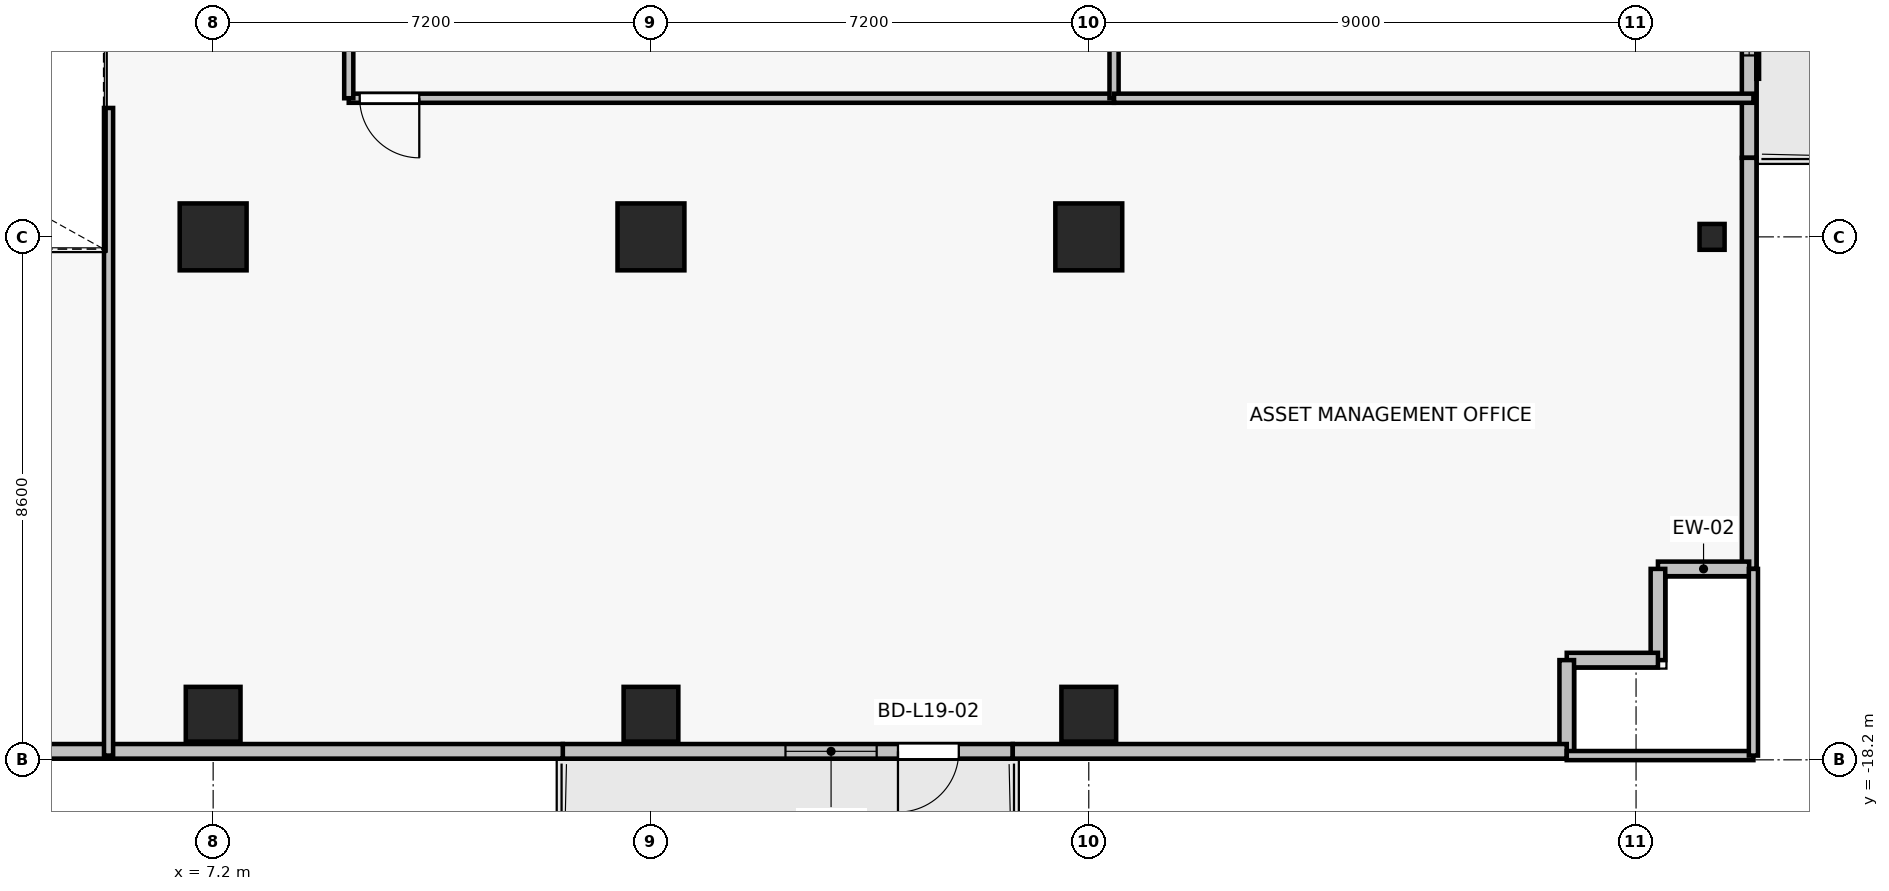
"""IFC4 building model, lengths in metres.
Left out: names, types, materials, properties, quantities, classifications, styles, units other than length and angle.
Written with IfcOpenShell. Run it as: python <this file> out.ifc"""

import sys

from ifc_helpers import new_model, si_unit, direction, frame, frame_2d, origin, origin_2d, place, context, subcontext, project, spatial, rectangle, i_section, extrude, source, transform, mapped, element, fill, save


model = new_model("IFC4")
c1 = context("Model", 3, precision=1e-05, world=origin(), true_north=direction((0.0, 1.0)))
c2 = subcontext(c1, "Body", "Model", "MODEL_VIEW")
j1 = project(units=[si_unit("LENGTHUNIT", "METRE"), si_unit("PLANEANGLEUNIT", "RADIAN")], contexts=[c1])
p1 = place(None, origin())
s1 = spatial("IfcSite", under=j1, at=p1, CompositionType="ELEMENT")
p2 = place(p1, origin())
s2 = spatial("IfcBuilding", under=s1, at=p2, CompositionType="ELEMENT")
p3 = place(p2, frame((0.0, 0.0, 70.3)))
s3 = spatial("IfcBuildingStorey", under=s2, at=p3, CompositionType="ELEMENT", Elevation=70.3)
for number, where, z_axis, x_axis in (
    (1, (7.2, -9.6, 0.0), (0.0, 0.0, 1.0), (1.0, 0.0, 0.0)),
    (2, (14.4, -9.6, 0.0), (0.0, 0.0, 1.0), (1.0, 0.0, 0.0)),
    (3, (21.6, -9.6, 0.0), (0.0, 0.0, 1.0), (1.0, 0.0, 0.0)),
):
    element("IfcColumn", number, at=place(p3, frame(where, z_axis=z_axis, x_axis=x_axis)), inside=s3, PredefinedType="COLUMN", context=c2, shape_type="SweptSolid", body=[
        extrude(rectangle(XDim=1.1, YDim=1.1, at=origin_2d()), origin(), (0.0, 0.0, 1.0), 3.3),
    ])
for number, where, z_axis, x_axis in (
    (4, (7.2, -17.45, 0.0), (0.0, 0.0, 1.0), (1.0, 0.0, 0.0)),
    (5, (14.4, -17.45, 0.0), (0.0, 0.0, 1.0), (1.0, 0.0, 0.0)),
    (6, (21.6, -17.45, 0.0), (0.0, 0.0, 1.0), (1.0, 0.0, 0.0)),
):
    element("IfcColumn", number, at=place(p3, frame(where, z_axis=z_axis, x_axis=x_axis)), inside=s3, PredefinedType="COLUMN", context=c2, shape_type="SweptSolid", body=[
        extrude(rectangle(XDim=0.9, YDim=0.9, at=origin_2d()), origin(), (0.0, 0.0, 1.0), 3.3),
    ])
p4 = place(p3, frame((31.85, -9.6, 0.0), z_axis=(0.0, 0.0, 1.0), x_axis=(1.0, 0.0, 0.0)))
e7 = element("IfcColumn", 7, at=p4, inside=s3, PredefinedType="COLUMN", context=c2, shape_type="SweptSolid", body=[
    extrude(i_section(OverallWidth=0.412, OverallDepth=0.425, WebThickness=0.026, FlangeThickness=0.039, FilletRadius=0.015, at=origin_2d()), origin(), (0.0, 0.0, 1.0), 3.3),
])
p5 = place(p3, frame((20.35, -18.06, 0.0), z_axis=(0.0, 0.0, 1.0), x_axis=(-1.0, 0.0, 0.0)))
e8 = element("IfcWall", 8, at=p5, inside=s3, PredefinedType="SOLIDWALL", context=c2, shape_type="SweptSolid", body=[
    extrude(rectangle(XDim=7.4, YDim=0.24, at=frame_2d((3.7, 0.0))), origin(), (0.0, 0.0, 1.0), 2.665),
])
p6 = place(p5, frame((0.888, 0.0, 0.0)))
e9 = element("IfcOpeningElement", 9, at=p6, cuts=e8, PredefinedType="OPENING", context=c2, shape_type="SweptSolid", body=[
    extrude(rectangle(XDim=1.0, YDim=2.2, at=frame_2d((0.5, 1.1))), frame((0.0, 0.13, 0.0), z_axis=(0.0, -1.0, 0.0), x_axis=(1.0, 0.0, 0.0)), (0.0, 0.0, 1.0), 0.26),
])
p7 = place(p5, frame((2.238, 0.0, 0.85)))
e10 = element("IfcOpeningElement", 10, at=p7, cuts=e8, PredefinedType="OPENING", context=c2, shape_type="SweptSolid", body=[
    extrude(rectangle(XDim=1.5, YDim=1.6, at=frame_2d((0.75, 0.8))), frame((0.0, 0.13, 0.0), z_axis=(0.0, -1.0, 0.0), x_axis=(1.0, 0.0, 0.0)), (0.0, 0.0, 1.0), 0.26),
])
p8 = place(p3, frame((32.46, -2.5, 0.0), z_axis=(0.0, 0.0, 1.0), x_axis=(0.0, -1.0, 0.0)))
e11 = element("IfcWall", 11, at=p8, inside=s3, PredefinedType="SOLIDWALL", context=c2, shape_type="SweptSolid", body=[
    extrude(rectangle(XDim=5.8, YDim=0.24, at=frame_2d((2.9, 0.0))), origin(), (0.0, 0.0, 1.0), 3.075),
])
p9 = place(p8, frame((1.566, 0.0, 0.0)))
e12 = element("IfcOpeningElement", 12, at=p9, cuts=e11, PredefinedType="OPENING", context=c2, shape_type="SweptSolid", body=[
    extrude(rectangle(XDim=1.0, YDim=2.2, at=frame_2d((0.5, 1.1))), frame((0.0, 0.13, 0.0), z_axis=(0.0, -1.0, 0.0), x_axis=(1.0, 0.0, 0.0)), (0.0, 0.0, 1.0), 0.26),
])
p10 = place(p8, frame((2.916, 0.0, 0.85)))
e13 = element("IfcOpeningElement", 13, at=p10, cuts=e11, PredefinedType="OPENING", context=c2, shape_type="SweptSolid", body=[
    extrude(rectangle(XDim=1.2, YDim=1.5, at=frame_2d((0.6, 0.75))), frame((0.0, 0.13, 0.0), z_axis=(0.0, -1.0, 0.0), x_axis=(1.0, 0.0, 0.0)), (0.0, 0.0, 1.0), 0.26),
])
p11 = place(p3, frame((32.46, -15.06, 0.0), z_axis=(0.0, 0.0, 1.0), x_axis=(0.0, 1.0, 0.0)))
e14 = element("IfcWall", 14, at=p11, inside=s3, PredefinedType="SOLIDWALL", context=c2, shape_type="SweptSolid", body=[
    extrude(rectangle(XDim=6.76, YDim=0.24, at=frame_2d((3.38, 0.0))), origin(), (0.0, 0.0, 1.0), 3.075),
])
for number, where, z_axis, x_axis in (
    (15, (30.96, -15.06, 0.0), (0.0, 0.0, 1.0), (1.0, 0.0, 0.0)),
    (16, (30.96, -16.56, 0.0), (0.0, 0.0, 1.0), (0.0, 1.0, 0.0)),
    (17, (29.46, -16.56, 0.0), (0.0, 0.0, 1.0), (1.0, 0.0, 0.0)),
    (18, (29.46, -18.06, 0.0), (0.0, 0.0, 1.0), (0.0, 1.0, 0.0)),
):
    element("IfcWall", number, at=place(p3, frame(where, z_axis=z_axis, x_axis=x_axis)), inside=s3, PredefinedType="SOLIDWALL", context=c2, shape_type="SweptSolid", body=[
        extrude(rectangle(XDim=1.5, YDim=0.24, at=frame_2d((0.75, 0.0))), origin(), (0.0, 0.0, 1.0), 3.075),
    ])
p12 = place(p3, frame((20.35, -18.06, 0.0), z_axis=(0.0, 0.0, 1.0), x_axis=(1.0, 0.0, 0.0)))
e19 = element("IfcWall", 19, at=p12, inside=s3, PredefinedType="SOLIDWALL", context=c2, shape_type="SweptSolid", body=[
    extrude(rectangle(XDim=9.11, YDim=0.24, at=frame_2d((4.555, 0.0))), origin(), (0.0, 0.0, 1.0), 3.075),
])
p13 = place(p3, frame((3.34, -18.06, 0.0), z_axis=(0.0, 0.0, 1.0), x_axis=(1.0, 0.0, 0.0)))
e20 = element("IfcWall", 20, at=p13, inside=s3, PredefinedType="SOLIDWALL", context=c2, shape_type="SweptSolid", body=[
    extrude(rectangle(XDim=9.61, YDim=0.24, at=frame_2d((4.805, 0.0))), origin(), (0.0, 0.0, 1.0), 2.665),
])
p14 = place(p3, frame((22.015, -7.32, 0.0), z_axis=(0.0, 0.0, 1.0), x_axis=(-1.0, 0.0, 0.0)))
e21 = element("IfcWall", 21, at=p14, inside=s3, PredefinedType="PARTITIONING", context=c2, shape_type="SweptSolid", body=[
    extrude(rectangle(XDim=12.585, YDim=0.15, at=frame_2d((6.293, 0.0))), origin(), (0.0, 0.0, 1.0), 2.465),
])
p15 = place(p14, frame((11.426, 0.0, 0.0)))
e22 = element("IfcOpeningElement", 22, at=p15, cuts=e21, PredefinedType="OPENING", context=c2, shape_type="SweptSolid", body=[
    extrude(rectangle(XDim=0.98, YDim=2.15, at=frame_2d((0.49, 1.075))), frame((0.0, 0.085, 0.0), z_axis=(0.0, -1.0, 0.0), x_axis=(1.0, 0.0, 0.0)), (0.0, 0.0, 1.0), 0.17),
])
for number, where, z_axis, x_axis in (
    (23, (9.43, -7.32, 0.0), (0.0, 0.0, 1.0), (0.0, 1.0, 0.0)),
    (24, (22.015, -3.83, 0.0), (0.0, 0.0, 1.0), (0.0, -1.0, 0.0)),
):
    element("IfcWall", number, at=place(p3, frame(where, z_axis=z_axis, x_axis=x_axis)), inside=s3, PredefinedType="PARTITIONING", context=c2, shape_type="SweptSolid", body=[
        extrude(rectangle(XDim=3.49, YDim=0.15, at=frame_2d((1.745, 0.0))), origin(), (0.0, 0.0, 1.0), 2.565),
    ])
p16 = place(p3, frame((32.53, -7.32, 0.0), z_axis=(0.0, 0.0, 1.0), x_axis=(-1.0, 0.0, 0.0)))
e25 = element("IfcWall", 25, at=p16, inside=s3, PredefinedType="PARTITIONING", context=c2, shape_type="SweptSolid", body=[
    extrude(rectangle(XDim=10.515, YDim=0.15, at=frame_2d((5.257, 0.0))), origin(), (0.0, 0.0, 1.0), 2.465),
])
p17 = place(p3, frame((32.53, -18.13, 0.0), z_axis=(0.0, 0.0, 1.0), x_axis=(-1.0, 0.0, 0.0)))
e26 = element("IfcWall", 26, at=p17, inside=s3, PredefinedType="PARTITIONING", context=c2, shape_type="SweptSolid", body=[
    extrude(rectangle(XDim=3.07, YDim=0.15, at=frame_2d((1.535, 0.0))), origin(), (0.0, 0.0, 1.0), 2.665),
])
p18 = place(p3, frame((5.48, -18.13, 0.0), z_axis=(0.0, 0.0, 1.0), x_axis=(0.0, 1.0, 0.0)))
e27 = element("IfcWall", 27, at=p18, inside=s3, PredefinedType="PARTITIONING", context=c2, shape_type="SweptSolid", body=[
    extrude(rectangle(XDim=10.65, YDim=0.15, at=frame_2d((5.325, 0.0))), origin(), (0.0, 0.0, 1.0), 2.465),
])
p19 = place(p3, frame((32.53, -15.06, 0.0), z_axis=(0.0, 0.0, 1.0), x_axis=(0.0, -1.0, 0.0)))
e28 = element("IfcWall", 28, at=p19, inside=s3, PredefinedType="PARTITIONING", context=c2, shape_type="SweptSolid", body=[
    extrude(rectangle(XDim=3.07, YDim=0.15, at=frame_2d((1.535, 0.0))), origin(), (0.0, 0.0, 1.0), 3.075),
])
m1 = source(origin(), c2, "Body", "SweptSolid", [
    extrude(rectangle(XDim=1.0, YDim=2.2, at=frame_2d((0.5, 1.1))), frame((0.0, 0.025, 0.0), z_axis=(0.0, -1.0, 0.0), x_axis=(1.0, 0.0, 0.0)), (0.0, 0.0, 1.0), 0.05),
])
p20 = place(p6, origin())
e29 = element("IfcDoor", 29, at=p20, inside=s3, OperationType="SINGLE_SWING_RIGHT", PredefinedType="DOOR", context=c2, shape_type="MappedRepresentation", body=[
    mapped(m1, transform((0.0, 0.0, 0.0), x_axis=(1.0, 0.0, 0.0), y_axis=(0.0, 1.0, 0.0), z_axis=(0.0, 0.0, 1.0), scale=1.0)),
])
fill(e9, e29)
m2 = source(origin(), c2, "Body", "SweptSolid", [
    extrude(rectangle(XDim=1.5, YDim=1.6, at=frame_2d((0.75, 0.8))), frame((0.0, 0.03, 0.0), z_axis=(0.0, -1.0, 0.0), x_axis=(1.0, 0.0, 0.0)), (0.0, 0.0, 1.0), 0.06),
])
p21 = place(p7, origin())
e30 = element("IfcWindow", 30, at=p21, inside=s3, PartitioningType="SINGLE_PANEL", PredefinedType="WINDOW", context=c2, shape_type="MappedRepresentation", body=[
    mapped(m2, transform((0.0, 0.0, 0.0), x_axis=(1.0, 0.0, 0.0), y_axis=(0.0, 1.0, 0.0), z_axis=(0.0, 0.0, 1.0), scale=1.0)),
])
fill(e10, e30)
m3 = source(origin(), c2, "Body", "SweptSolid", [
    extrude(rectangle(XDim=1.2, YDim=1.5, at=frame_2d((0.6, 0.75))), frame((0.0, 0.03, 0.0), z_axis=(0.0, -1.0, 0.0), x_axis=(1.0, 0.0, 0.0)), (0.0, 0.0, 1.0), 0.06),
])
p22 = place(p10, origin())
e31 = element("IfcWindow", 31, at=p22, inside=s3, PartitioningType="SINGLE_PANEL", PredefinedType="WINDOW", context=c2, shape_type="MappedRepresentation", body=[
    mapped(m3, transform((0.0, 0.0, 0.0), x_axis=(1.0, 0.0, 0.0), y_axis=(0.0, 1.0, 0.0), z_axis=(0.0, 0.0, 1.0), scale=1.0)),
])
fill(e13, e31)
m4 = source(origin(), c2, "Body", "SweptSolid", [
    extrude(rectangle(XDim=0.98, YDim=2.15, at=frame_2d((0.49, 1.075))), frame((0.0, 0.025, 0.0), z_axis=(0.0, -1.0, 0.0), x_axis=(1.0, 0.0, 0.0)), (0.0, 0.0, 1.0), 0.05),
])
p23 = place(p15, origin())
e32 = element("IfcDoor", 32, at=p23, inside=s3, OperationType="SINGLE_SWING_LEFT", PredefinedType="DOOR", context=c2, shape_type="MappedRepresentation", body=[
    mapped(m4, transform((0.0, 0.0, 0.0), x_axis=(1.0, 0.0, 0.0), y_axis=(0.0, 1.0, 0.0), z_axis=(0.0, 0.0, 1.0), scale=1.0)),
])
fill(e22, e32)
save(model, sys.argv[1])
